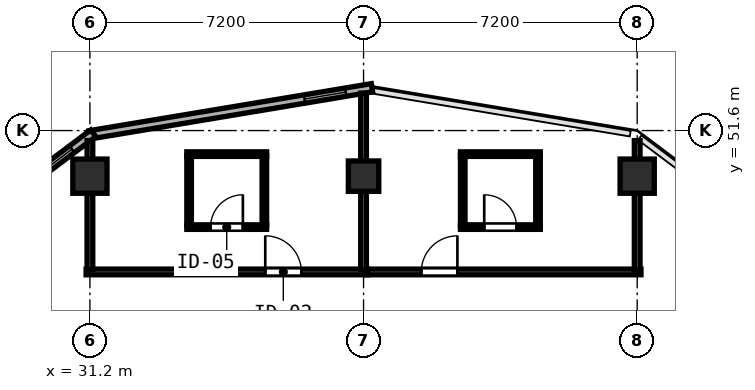
"""IFC4 building model, lengths in metres.
Left out: names, types, materials, properties, quantities, classifications, styles, units other than length and angle.
Written with IfcOpenShell. Run it as: python <this file> out.ifc"""

import sys

from ifc_helpers import new_model, si_unit, direction, frame, frame_2d, origin, origin_2d, place, context, subcontext, project, spatial, rectangle, hollow_rectangle, extrude, element, fill, save


model = new_model("IFC4")
c1 = context("Model", 3, precision=1e-05, world=origin(), true_north=direction((0.0, 1.0)))
c2 = subcontext(c1, "Body", "Model", "MODEL_VIEW")
j1 = project(units=[si_unit("LENGTHUNIT", "METRE"), si_unit("PLANEANGLEUNIT", "RADIAN")], contexts=[c1])
p1 = place(None, origin())
s1 = spatial("IfcSite", under=j1, at=p1, CompositionType="ELEMENT")
p2 = place(p1, origin())
s2 = spatial("IfcBuilding", under=s1, at=p2, CompositionType="ELEMENT")
p3 = place(p2, frame((0.0, 0.0, 169.0)))
s3 = spatial("IfcBuildingStorey", under=s2, at=p3, CompositionType="ELEMENT", Elevation=169.0)
for number, where, z_axis, x_axis in (
    (1, (31.2, 50.4, 0.0), (0.0, 0.0, 1.0), (1.0, 0.0, 0.0)),
    (2, (45.6, 50.4, 0.0), (0.0, 0.0, 1.0), (1.0, 0.0, 0.0)),
):
    element("IfcColumn", number, at=place(p3, frame(where, z_axis=z_axis, x_axis=x_axis)), inside=s3, PredefinedType="COLUMN", context=c2, shape_type="SweptSolid", body=[
        extrude(hollow_rectangle(XDim=0.9, YDim=0.9, WallThickness=0.034, at=origin_2d()), origin(), (0.0, 0.0, 1.0), 3.8),
    ])
p4 = place(p3, frame((38.4, 50.4, 0.0), z_axis=(0.0, 0.0, 1.0), x_axis=(1.0, 0.0, 0.0)))
e3 = element("IfcColumn", 3, at=p4, inside=s3, PredefinedType="COLUMN", context=c2, shape_type="SweptSolid", body=[
    extrude(hollow_rectangle(XDim=0.8, YDim=0.8, WallThickness=0.03, at=origin_2d()), origin(), (0.0, 0.0, 1.0), 3.8),
])
p5 = place(p3, frame((38.622, 52.726, 0.0), z_axis=(0.0, 0.0, 1.0), x_axis=(-0.986390420428, -0.164420006349, 0.0)))
e4 = element("IfcWall", 4, at=p5, inside=s3, PredefinedType="SOLIDWALL", context=c2, shape_type="SweptSolid", body=[
    extrude(rectangle(XDim=7.534, YDim=0.22, at=frame_2d((3.767, 0.0))), origin(), (0.0, 0.0, 1.0), 3.62),
])
p6 = place(p5, frame((0.7, 0.0, 0.85)))
e5 = element("IfcOpeningElement", 5, at=p6, cuts=e4, PredefinedType="OPENING", context=c2, shape_type="SweptSolid", body=[
    extrude(rectangle(XDim=1.1, YDim=1.75, at=frame_2d((0.55, 0.875))), frame((0.0, 0.12, 0.0), z_axis=(0.0, -1.0, 0.0), x_axis=(1.0, 0.0, 0.0)), (0.0, 0.0, 1.0), 0.24),
])
p7 = place(p3, frame((31.289, 51.529, 0.0), z_axis=(0.0, 0.0, 1.0), x_axis=(-0.800014580093, -0.599980559383, 0.0)))
e6 = element("IfcWall", 6, at=p7, inside=s3, PredefinedType="SOLIDWALL", context=c2, shape_type="SweptSolid", body=[
    extrude(rectangle(XDim=6.028, YDim=0.22, at=frame_2d((3.014, 0.0))), origin(), (0.0, 0.0, 1.0), 3.62),
])
p8 = place(p7, frame((0.7, 0.0, 0.85)))
e7 = element("IfcOpeningElement", 7, at=p8, cuts=e6, PredefinedType="OPENING", context=c2, shape_type="SweptSolid", body=[
    extrude(rectangle(XDim=1.1, YDim=1.75, at=frame_2d((0.55, 0.875))), frame((0.0, 0.12, 0.0), z_axis=(0.0, -1.0, 0.0), x_axis=(1.0, 0.0, 0.0)), (0.0, 0.0, 1.0), 0.24),
])
p9 = place(p3, frame((31.1, 47.88, 0.0), z_axis=(0.0, 0.0, 1.0), x_axis=(1.0, 0.0, 0.0)))
e8 = element("IfcWall", 8, at=p9, inside=s3, PredefinedType="PARTITIONING", context=c2, shape_type="SweptSolid", body=[
    extrude(rectangle(XDim=7.4, YDim=0.15, at=frame_2d((3.7, 0.0))), origin(), (0.0, 0.0, 1.0), 3.62),
])
p10 = place(p9, frame((4.714, 0.0, 0.0)))
e9 = element("IfcOpeningElement", 9, at=p10, cuts=e8, PredefinedType="OPENING", context=c2, shape_type="SweptSolid", body=[
    extrude(rectangle(XDim=0.95, YDim=2.15, at=frame_2d((0.475, 1.075))), frame((0.0, 0.085, 0.0), z_axis=(0.0, -1.0, 0.0), x_axis=(1.0, 0.0, 0.0)), (0.0, 0.0, 1.0), 0.17),
])
p11 = place(p3, frame((31.2, 47.94, 0.0), z_axis=(0.0, 0.0, 1.0), x_axis=(0.0, 1.0, 0.0)))
e10 = element("IfcWall", 10, at=p11, inside=s3, PredefinedType="PARTITIONING", context=c2, shape_type="SweptSolid", body=[
    extrude(rectangle(XDim=3.395, YDim=0.15, at=frame_2d((1.698, 0.0))), origin(), (0.0, 0.0, 1.0), 3.105),
])
p12 = place(p3, frame((38.4, 47.94, 0.0), z_axis=(0.0, 0.0, 1.0), x_axis=(0.0, 1.0, 0.0)))
e11 = element("IfcWall", 11, at=p12, inside=s3, PredefinedType="PARTITIONING", context=c2, shape_type="SweptSolid", body=[
    extrude(rectangle(XDim=4.645, YDim=0.15, at=frame_2d((2.323, 0.0))), origin(), (0.0, 0.0, 1.0), 3.62),
])
p13 = place(p3, frame((33.75, 50.98, 0.0), z_axis=(0.0, 0.0, 1.0), x_axis=(1.0, 0.0, 0.0)))
e12 = element("IfcWall", 12, at=p13, inside=s3, PredefinedType="PARTITIONING", context=c2, shape_type="SweptSolid", body=[
    extrude(rectangle(XDim=2.1, YDim=0.12, at=frame_2d((1.05, 0.0))), origin(), (0.0, 0.0, 1.0), 3.62),
])
p14 = place(p3, frame((33.75, 49.06, 0.0), z_axis=(0.0, 0.0, 1.0), x_axis=(1.0, 0.0, 0.0)))
e13 = element("IfcWall", 13, at=p14, inside=s3, PredefinedType="PARTITIONING", context=c2, shape_type="SweptSolid", body=[
    extrude(rectangle(XDim=2.1, YDim=0.12, at=frame_2d((1.05, 0.0))), origin(), (0.0, 0.0, 1.0), 3.62),
])
p15 = place(p14, frame((0.625, 0.0, 0.0)))
e14 = element("IfcOpeningElement", 14, at=p15, cuts=e13, PredefinedType="OPENING", context=c2, shape_type="SweptSolid", body=[
    extrude(rectangle(XDim=0.85, YDim=2.1, at=frame_2d((0.425, 1.05))), frame((0.0, 0.07, 0.0), z_axis=(0.0, -1.0, 0.0), x_axis=(1.0, 0.0, 0.0)), (0.0, 0.0, 1.0), 0.14),
])
for number, where, z_axis, x_axis in (
    (15, (33.81, 49.105, 0.0), (0.0, 0.0, 1.0), (0.0, 1.0, 0.0)),
    (16, (35.79, 49.105, 0.0), (0.0, 0.0, 1.0), (0.0, 1.0, 0.0)),
):
    element("IfcWall", number, at=place(p3, frame(where, z_axis=z_axis, x_axis=x_axis)), inside=s3, PredefinedType="PARTITIONING", context=c2, shape_type="SweptSolid", body=[
        extrude(rectangle(XDim=1.83, YDim=0.12, at=frame_2d((0.915, 0.0))), origin(), (0.0, 0.0, 1.0), 3.62),
    ])
p16 = place(p3, frame((38.502, 47.88, 0.0), z_axis=(0.0, 0.0, 1.0), x_axis=(1.0, 0.0, 0.0)))
e17 = element("IfcWall", 17, at=p16, inside=s3, PredefinedType="PARTITIONING", context=c2, shape_type="SweptSolid", body=[
    extrude(rectangle(XDim=7.198, YDim=0.15, at=frame_2d((3.599, 0.0))), origin(), (0.0, 0.0, 1.0), 3.62),
])
p17 = place(p16, frame((1.417, 0.0, 0.0)))
e18 = element("IfcOpeningElement", 18, at=p17, cuts=e17, PredefinedType="OPENING", context=c2, shape_type="SweptSolid", body=[
    extrude(rectangle(XDim=0.95, YDim=2.15, at=frame_2d((0.475, 1.075))), frame((0.0, 0.085, 0.0), z_axis=(0.0, -1.0, 0.0), x_axis=(1.0, 0.0, 0.0)), (0.0, 0.0, 1.0), 0.17),
])
p18 = place(p3, frame((45.6, 47.94, 0.0), z_axis=(0.0, 0.0, 1.0), x_axis=(0.0, 1.0, 0.0)))
e19 = element("IfcWall", 19, at=p18, inside=s3, PredefinedType="PARTITIONING", context=c2, shape_type="SweptSolid", body=[
    extrude(rectangle(XDim=3.395, YDim=0.15, at=frame_2d((1.698, 0.0))), origin(), (0.0, 0.0, 1.0), 3.105),
])
p19 = place(p3, frame((40.95, 50.98, 0.0), z_axis=(0.0, 0.0, 1.0), x_axis=(1.0, 0.0, 0.0)))
e20 = element("IfcWall", 20, at=p19, inside=s3, PredefinedType="PARTITIONING", context=c2, shape_type="SweptSolid", body=[
    extrude(rectangle(XDim=2.1, YDim=0.12, at=frame_2d((1.05, 0.0))), origin(), (0.0, 0.0, 1.0), 3.62),
])
p20 = place(p3, frame((40.95, 49.06, 0.0), z_axis=(0.0, 0.0, 1.0), x_axis=(1.0, 0.0, 0.0)))
e21 = element("IfcWall", 21, at=p20, inside=s3, PredefinedType="PARTITIONING", context=c2, shape_type="SweptSolid", body=[
    extrude(rectangle(XDim=2.1, YDim=0.12, at=frame_2d((1.05, 0.0))), origin(), (0.0, 0.0, 1.0), 3.62),
])
p21 = place(p20, frame((0.625, 0.0, 0.0)))
e22 = element("IfcOpeningElement", 22, at=p21, cuts=e21, PredefinedType="OPENING", context=c2, shape_type="SweptSolid", body=[
    extrude(rectangle(XDim=0.85, YDim=2.1, at=frame_2d((0.425, 1.05))), frame((0.0, 0.07, 0.0), z_axis=(0.0, -1.0, 0.0), x_axis=(1.0, 0.0, 0.0)), (0.0, 0.0, 1.0), 0.14),
])
for number, where, z_axis, x_axis in (
    (23, (41.01, 49.105, 0.0), (0.0, 0.0, 1.0), (0.0, 1.0, 0.0)),
    (24, (42.99, 49.105, 0.0), (0.0, 0.0, 1.0), (0.0, 1.0, 0.0)),
):
    element("IfcWall", number, at=place(p3, frame(where, z_axis=z_axis, x_axis=x_axis)), inside=s3, PredefinedType="PARTITIONING", context=c2, shape_type="SweptSolid", body=[
        extrude(rectangle(XDim=1.83, YDim=0.12, at=frame_2d((0.915, 0.0))), origin(), (0.0, 0.0, 1.0), 3.62),
    ])
p22 = place(p6, origin())
e25 = element("IfcWindow", 25, at=p22, inside=s3, PartitioningType="SINGLE_PANEL", PredefinedType="WINDOW", context=c2, shape_type="SweptSolid", body=[
    extrude(rectangle(XDim=1.1, YDim=1.75, at=frame_2d((0.55, 0.875))), frame((0.0, 0.03, 0.0), z_axis=(0.0, -1.0, 0.0), x_axis=(1.0, 0.0, 0.0)), (0.0, 0.0, 1.0), 0.06),
])
fill(e5, e25)
p23 = place(p8, origin())
e26 = element("IfcWindow", 26, at=p23, inside=s3, PartitioningType="SINGLE_PANEL", PredefinedType="WINDOW", context=c2, shape_type="SweptSolid", body=[
    extrude(rectangle(XDim=1.1, YDim=1.75, at=frame_2d((0.55, 0.875))), frame((0.0, 0.03, 0.0), z_axis=(0.0, -1.0, 0.0), x_axis=(1.0, 0.0, 0.0)), (0.0, 0.0, 1.0), 0.06),
])
fill(e7, e26)
p24 = place(p10, origin())
e27 = element("IfcDoor", 27, at=p24, inside=s3, OperationType="SINGLE_SWING_LEFT", PredefinedType="DOOR", context=c2, shape_type="SweptSolid", body=[
    extrude(rectangle(XDim=0.95, YDim=2.15, at=frame_2d((0.475, 1.075))), frame((0.0, 0.025, 0.0), z_axis=(0.0, -1.0, 0.0), x_axis=(1.0, 0.0, 0.0)), (0.0, 0.0, 1.0), 0.05),
])
fill(e9, e27)
p25 = place(p15, origin())
e28 = element("IfcDoor", 28, at=p25, inside=s3, OperationType="SINGLE_SWING_RIGHT", PredefinedType="DOOR", context=c2, shape_type="SweptSolid", body=[
    extrude(rectangle(XDim=0.85, YDim=2.1, at=frame_2d((0.425, 1.05))), frame((0.0, 0.025, 0.0), z_axis=(0.0, -1.0, 0.0), x_axis=(1.0, 0.0, 0.0)), (0.0, 0.0, 1.0), 0.05),
])
fill(e14, e28)
p26 = place(p17, origin())
e29 = element("IfcDoor", 29, at=p26, inside=s3, OperationType="SINGLE_SWING_RIGHT", PredefinedType="DOOR", context=c2, shape_type="SweptSolid", body=[
    extrude(rectangle(XDim=0.95, YDim=2.15, at=frame_2d((0.475, 1.075))), frame((0.0, 0.025, 0.0), z_axis=(0.0, -1.0, 0.0), x_axis=(1.0, 0.0, 0.0)), (0.0, 0.0, 1.0), 0.05),
])
fill(e18, e29)
p27 = place(p21, origin())
e30 = element("IfcDoor", 30, at=p27, inside=s3, OperationType="SINGLE_SWING_LEFT", PredefinedType="DOOR", context=c2, shape_type="SweptSolid", body=[
    extrude(rectangle(XDim=0.85, YDim=2.1, at=frame_2d((0.425, 1.05))), frame((0.0, 0.025, 0.0), z_axis=(0.0, -1.0, 0.0), x_axis=(1.0, 0.0, 0.0)), (0.0, 0.0, 1.0), 0.05),
])
fill(e22, e30)
save(model, sys.argv[1])
